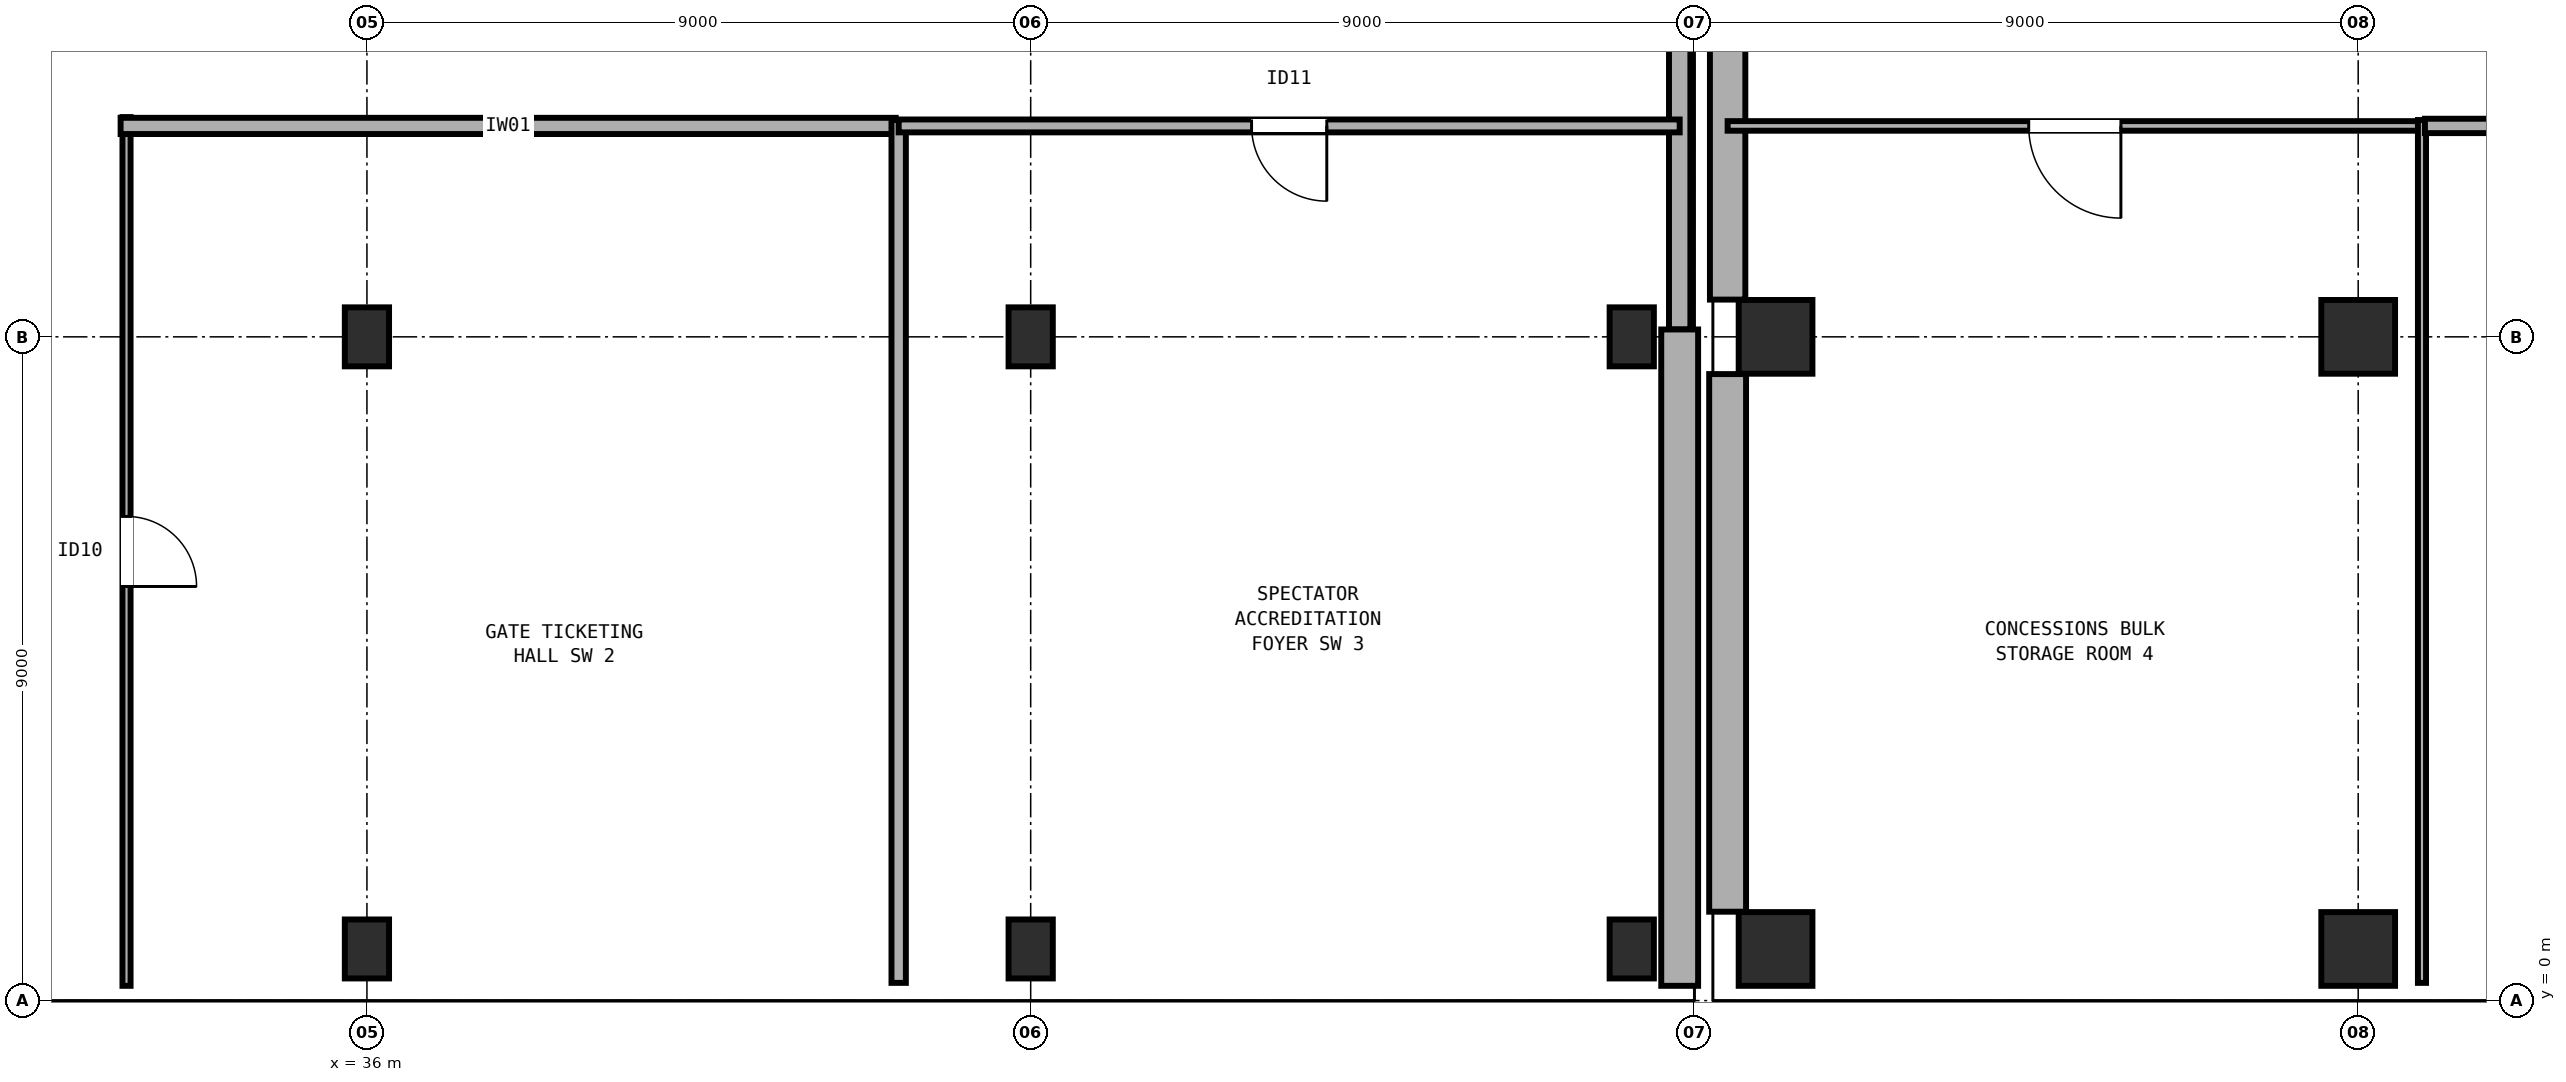
"""IFC4 building model, lengths in metres.
Left out: names, types, materials, properties, quantities, classifications, styles, units other than length and angle.
Written with IfcOpenShell. Run it as: python <this file> out.ifc"""

import sys

from ifc_helpers import new_model, si_unit, direction, frame, frame_2d, origin, origin_2d, place, context, subcontext, project, spatial, rectangle, extrude, element, fill, save


model = new_model("IFC4")
c1 = context("Model", 3, precision=1e-05, world=origin(), true_north=direction((0.0, 1.0)))
c2 = subcontext(c1, "Body", "Model", "MODEL_VIEW")
j1 = project(units=[si_unit("LENGTHUNIT", "METRE"), si_unit("PLANEANGLEUNIT", "RADIAN")], contexts=[c1])
p1 = place(None, origin())
s1 = spatial("IfcSite", under=j1, at=p1, CompositionType="ELEMENT")
p2 = place(p1, origin())
s2 = spatial("IfcBuilding", under=s1, at=p2, CompositionType="ELEMENT")
p3 = place(p2, origin())
s3 = spatial("IfcBuildingStorey", under=s2, at=p3, CompositionType="ELEMENT", Elevation=0.0)
for number, where, z_axis, x_axis in (
    (1, (55.1, 0.7, 0.0), (0.0, 0.0, 1.0), (1.0, 0.0, 0.0)),
    (2, (55.1, 9.0, 0.0), (0.0, 0.0, 1.0), (1.0, 0.0, 0.0)),
    (3, (63.0, 0.7, 0.0), (0.0, 0.0, 1.0), (1.0, 0.0, 0.0)),
    (4, (63.0, 9.0, 0.0), (0.0, 0.0, 1.0), (1.0, 0.0, 0.0)),
):
    element("IfcColumn", number, at=place(p3, frame(where, z_axis=z_axis, x_axis=x_axis)), inside=s3, PredefinedType="COLUMN", context=c2, shape_type="SweptSolid", body=[
        extrude(rectangle(XDim=1.0, YDim=1.0, at=origin_2d()), origin(), (0.0, 0.0, 1.0), 4.8),
    ])
for number, where, z_axis, x_axis in (
    (5, (36.0, 0.7, 0.0), (0.0, 0.0, 1.0), (1.0, 0.0, 0.0)),
    (6, (36.0, 9.0, 0.0), (0.0, 0.0, 1.0), (1.0, 0.0, 0.0)),
    (7, (45.0, 0.7, 0.0), (0.0, 0.0, 1.0), (1.0, 0.0, 0.0)),
    (8, (45.0, 9.0, 0.0), (0.0, 0.0, 1.0), (1.0, 0.0, 0.0)),
    (9, (53.15, 0.7, 0.0), (0.0, 0.0, 1.0), (1.0, 0.0, 0.0)),
    (10, (53.15, 9.0, 0.0), (0.0, 0.0, 1.0), (1.0, 0.0, 0.0)),
):
    element("IfcColumn", number, at=place(p3, frame(where, z_axis=z_axis, x_axis=x_axis)), inside=s3, PredefinedType="COLUMN", context=c2, shape_type="SweptSolid", body=[
        extrude(rectangle(XDim=0.6, YDim=0.8, at=origin_2d()), origin(), (0.0, 0.0, 1.0), 4.8),
    ])
p4 = place(p3, frame((54.45, 1.205, 0.0), z_axis=(0.0, 0.0, 1.0), x_axis=(0.0, 1.0, 0.0)))
e11 = element("IfcWall", 11, at=p4, inside=s3, PredefinedType="SOLIDWALL", context=c2, shape_type="SweptSolid", body=[
    extrude(rectangle(XDim=7.29, YDim=0.5, at=frame_2d((3.645, 0.0))), origin(), (0.0, 0.0, 1.0), 3.28),
])
p5 = place(p3, frame((54.45, 9.505, 0.0), z_axis=(0.0, 0.0, 1.0), x_axis=(0.0, 1.0, 0.0)))
e12 = element("IfcWall", 12, at=p5, inside=s3, PredefinedType="SOLIDWALL", context=c2, shape_type="SweptSolid", body=[
    extrude(rectangle(XDim=7.99, YDim=0.48, at=frame_2d((3.995, 0.0))), origin(), (0.0, 0.0, 1.0), 3.28),
])
p6 = place(p3, frame((71.495, 0.2, 0.0), z_axis=(0.0, 0.0, 1.0), x_axis=(-1.0, 0.0, 0.0)))
e13 = element("IfcWall", 13, at=p6, inside=s3, PredefinedType="SOLIDWALL", context=c2, shape_type="SweptSolid", body=[
    extrude(rectangle(XDim=7.99, YDim=0.31, at=frame_2d((3.995, 0.0))), origin(), (0.0, 0.0, 1.0), 3.58),
])
p7 = place(p6, frame((2.545, 0.0, 0.0)))
e14 = element("IfcOpeningElement", 14, at=p7, cuts=e13, PredefinedType="OPENING", context=c2, shape_type="SweptSolid", body=[
    extrude(rectangle(XDim=2.9, YDim=2.45, at=frame_2d((1.45, 1.225))), frame((0.0, 0.165, 0.0), z_axis=(0.0, -1.0, 0.0), x_axis=(1.0, 0.0, 0.0)), (0.0, 0.0, 1.0), 0.33),
])
p8 = place(p3, frame((62.495, 0.2, 0.0), z_axis=(0.0, 0.0, 1.0), x_axis=(-1.0, 0.0, 0.0)))
e15 = element("IfcWall", 15, at=p8, inside=s3, PredefinedType="SOLIDWALL", context=c2, shape_type="SweptSolid", body=[
    extrude(rectangle(XDim=6.89, YDim=0.29, at=frame_2d((3.445, 0.0))), origin(), (0.0, 0.0, 1.0), 3.58),
])
p9 = place(p8, frame((1.845, 0.0, 0.0)))
e16 = element("IfcOpeningElement", 16, at=p9, cuts=e15, PredefinedType="OPENING", context=c2, shape_type="SweptSolid", body=[
    extrude(rectangle(XDim=3.2, YDim=2.5, at=frame_2d((1.6, 1.25))), frame((0.0, 0.155, 0.0), z_axis=(0.0, -1.0, 0.0), x_axis=(1.0, 0.0, 0.0)), (0.0, 0.0, 1.0), 0.31),
])
p10 = place(p3, frame((53.8, 18.0, 0.0), z_axis=(0.0, 0.0, 1.0), x_axis=(0.0, -1.0, 0.0)))
e17 = element("IfcWall", 17, at=p10, inside=s3, PredefinedType="SOLIDWALL", context=c2, shape_type="SweptSolid", body=[
    extrude(rectangle(XDim=8.9, YDim=0.29, at=frame_2d((4.45, 0.0))), origin(), (0.0, 0.0, 1.0), 3.28),
])
p11 = place(p3, frame((53.8, 9.1, 0.0), z_axis=(0.0, 0.0, 1.0), x_axis=(0.0, -1.0, 0.0)))
e18 = element("IfcWall", 18, at=p11, inside=s3, PredefinedType="SOLIDWALL", context=c2, shape_type="SweptSolid", body=[
    extrude(rectangle(XDim=8.9, YDim=0.5, at=frame_2d((4.45, 0.0))), origin(), (0.0, 0.0, 1.0), 3.28),
])
p12 = place(p3, frame((52.845, 0.2, 0.0), z_axis=(0.0, 0.0, 1.0), x_axis=(-1.0, 0.0, 0.0)))
e19 = element("IfcWall", 19, at=p12, inside=s3, PredefinedType="SOLIDWALL", context=c2, shape_type="SweptSolid", body=[
    extrude(rectangle(XDim=7.54, YDim=0.48, at=frame_2d((3.77, 0.0))), origin(), (0.0, 0.0, 1.0), 3.28),
])
p13 = place(p12, frame((2.22, 0.0, 0.0)))
e20 = element("IfcOpeningElement", 20, at=p13, cuts=e19, PredefinedType="OPENING", context=c2, shape_type="SweptSolid", body=[
    extrude(rectangle(XDim=3.1, YDim=2.5, at=frame_2d((1.55, 1.25))), frame((0.0, 0.25, 0.0), z_axis=(0.0, -1.0, 0.0), x_axis=(1.0, 0.0, 0.0)), (0.0, 0.0, 1.0), 0.5),
])
p14 = place(p3, frame((44.695, 0.2, 0.0), z_axis=(0.0, 0.0, 1.0), x_axis=(-1.0, 0.0, 0.0)))
e21 = element("IfcWall", 21, at=p14, inside=s3, PredefinedType="SOLIDWALL", context=c2, shape_type="SweptSolid", body=[
    extrude(rectangle(XDim=8.39, YDim=0.31, at=frame_2d((4.195, 0.0))), origin(), (0.0, 0.0, 1.0), 3.28),
])
p15 = place(p14, frame((2.695, 0.0, 0.0)))
e22 = element("IfcOpeningElement", 22, at=p15, cuts=e21, PredefinedType="OPENING", context=c2, shape_type="SweptSolid", body=[
    extrude(rectangle(XDim=3.0, YDim=2.45, at=frame_2d((1.5, 1.225))), frame((0.0, 0.165, 0.0), z_axis=(0.0, -1.0, 0.0), x_axis=(1.0, 0.0, 0.0)), (0.0, 0.0, 1.0), 0.33),
])
p16 = place(p3, frame((35.695, 0.2, 0.0), z_axis=(0.0, 0.0, 1.0), x_axis=(-1.0, 0.0, 0.0)))
e23 = element("IfcWall", 23, at=p16, inside=s3, PredefinedType="SOLIDWALL", context=c2, shape_type="SweptSolid", body=[
    extrude(rectangle(XDim=8.39, YDim=0.29, at=frame_2d((4.195, 0.0))), origin(), (0.0, 0.0, 1.0), 3.58),
])
p17 = place(p16, frame((3.495, 0.0, 0.0)))
e24 = element("IfcOpeningElement", 24, at=p17, cuts=e23, PredefinedType="OPENING", context=c2, shape_type="SweptSolid", body=[
    extrude(rectangle(XDim=3.4, YDim=2.55, at=frame_2d((1.7, 1.275))), frame((0.0, 0.155, 0.0), z_axis=(0.0, -1.0, 0.0), x_axis=(1.0, 0.0, 0.0)), (0.0, 0.0, 1.0), 0.31),
])
p18 = place(p3, frame((63.865, 11.86, 0.0), z_axis=(0.0, 0.0, 1.0), x_axis=(-1.0, 0.0, 0.0)))
e25 = element("IfcWall", 25, at=p18, inside=s3, PredefinedType="PARTITIONING", context=c2, shape_type="SweptSolid", body=[
    extrude(rectangle(XDim=9.415, YDim=0.13, at=frame_2d((4.708, 0.0))), origin(), (0.0, 0.0, 1.0), 3.28),
])
p19 = place(p18, frame((4.083, 0.0, 0.0)))
e26 = element("IfcOpeningElement", 26, at=p19, cuts=e25, PredefinedType="OPENING", context=c2, shape_type="SweptSolid", body=[
    extrude(rectangle(XDim=1.25, YDim=2.15, at=frame_2d((0.625, 1.075))), frame((0.0, 0.075, 0.0), z_axis=(0.0, -1.0, 0.0), x_axis=(1.0, 0.0, 0.0)), (0.0, 0.0, 1.0), 0.15),
])
p20 = place(p3, frame((63.865, 11.94, 0.0), z_axis=(0.0, 0.0, 1.0), x_axis=(0.0, -1.0, 0.0)))
e27 = element("IfcWall", 27, at=p20, inside=s3, PredefinedType="PARTITIONING", context=c2, shape_type="SweptSolid", body=[
    extrude(rectangle(XDim=11.7, YDim=0.11, at=frame_2d((5.85, 0.0))), origin(), (0.0, 0.0, 1.0), 3.28),
])
p21 = place(p3, frame((63.905, 11.86, 0.0), z_axis=(0.0, 0.0, 1.0), x_axis=(1.0, 0.0, 0.0)))
e28 = element("IfcWall", 28, at=p21, inside=s3, PredefinedType="PARTITIONING", context=c2, shape_type="SweptSolid", body=[
    extrude(rectangle(XDim=9.335, YDim=0.195, at=frame_2d((4.667, 0.0))), origin(), (0.0, 0.0, 1.0), 3.28),
])
p22 = place(p3, frame((32.74, 11.98, 0.0), z_axis=(0.0, 0.0, 1.0), x_axis=(0.0, -1.0, 0.0)))
e29 = element("IfcWall", 29, at=p22, inside=s3, PredefinedType="PARTITIONING", context=c2, shape_type="SweptSolid", body=[
    extrude(rectangle(XDim=11.78, YDim=0.11, at=frame_2d((5.89, 0.0))), origin(), (0.0, 0.0, 1.0), 3.28),
])
p23 = place(p22, frame((5.415, 0.0, 0.0)))
e30 = element("IfcOpeningElement", 30, at=p23, cuts=e29, PredefinedType="OPENING", context=c2, shape_type="SweptSolid", body=[
    extrude(rectangle(XDim=0.95, YDim=2.18, at=frame_2d((0.475, 1.09))), frame((0.0, 0.065, 0.0), z_axis=(0.0, -1.0, 0.0), x_axis=(1.0, 0.0, 0.0)), (0.0, 0.0, 1.0), 0.13),
])
p24 = place(p3, frame((32.66, 11.86, 0.0), z_axis=(0.0, 0.0, 1.0), x_axis=(1.0, 0.0, 0.0)))
e31 = element("IfcWall", 31, at=p24, inside=s3, PredefinedType="PARTITIONING", context=c2, shape_type="SweptSolid", body=[
    extrude(rectangle(XDim=10.51, YDim=0.22, at=frame_2d((5.255, 0.0))), origin(), (0.0, 0.0, 1.0), 3.28),
])
p25 = place(p3, frame((43.21, 11.94, 0.0), z_axis=(0.0, 0.0, 1.0), x_axis=(0.0, -1.0, 0.0)))
e32 = element("IfcWall", 32, at=p25, inside=s3, PredefinedType="PARTITIONING", context=c2, shape_type="SweptSolid", body=[
    extrude(rectangle(XDim=11.7, YDim=0.195, at=frame_2d((5.85, 0.0))), origin(), (0.0, 0.0, 1.0), 3.28),
])
p26 = place(p3, frame((53.8, 11.86, 0.0), z_axis=(0.0, 0.0, 1.0), x_axis=(-1.0, 0.0, 0.0)))
e33 = element("IfcWall", 33, at=p26, inside=s3, PredefinedType="PARTITIONING", context=c2, shape_type="SweptSolid", body=[
    extrude(rectangle(XDim=10.59, YDim=0.175, at=frame_2d((5.295, 0.0))), origin(), (0.0, 0.0, 1.0), 3.28),
])
p27 = place(p26, frame((4.785, 0.0, 0.0)))
e34 = element("IfcOpeningElement", 34, at=p27, cuts=e33, PredefinedType="OPENING", context=c2, shape_type="SweptSolid", body=[
    extrude(rectangle(XDim=1.02, YDim=2.16, at=frame_2d((0.51, 1.08))), frame((0.0, 0.097, 0.0), z_axis=(0.0, -1.0, 0.0), x_axis=(1.0, 0.0, 0.0)), (0.0, 0.0, 1.0), 0.195),
])
p28 = place(p17, origin())
e35 = element("IfcDoor", 35, at=p28, inside=s3, OperationType="DOUBLE_DOOR_SINGLE_SWING", PredefinedType="DOOR", context=c2, shape_type="SweptSolid", body=[
    extrude(rectangle(XDim=3.4, YDim=2.55, at=frame_2d((1.7, 1.275))), frame((0.0, 0.025, 0.0), z_axis=(0.0, -1.0, 0.0), x_axis=(1.0, 0.0, 0.0)), (0.0, 0.0, 1.0), 0.05),
])
fill(e24, e35)
p29 = place(p9, origin())
e36 = element("IfcDoor", 36, at=p29, inside=s3, OperationType="DOUBLE_DOOR_SINGLE_SWING", PredefinedType="DOOR", context=c2, shape_type="SweptSolid", body=[
    extrude(rectangle(XDim=3.2, YDim=2.5, at=frame_2d((1.6, 1.25))), frame((0.0, 0.025, 0.0), z_axis=(0.0, -1.0, 0.0), x_axis=(1.0, 0.0, 0.0)), (0.0, 0.0, 1.0), 0.05),
])
fill(e16, e36)
p30 = place(p13, origin())
e37 = element("IfcDoor", 37, at=p30, inside=s3, OperationType="DOUBLE_DOOR_SINGLE_SWING", PredefinedType="DOOR", context=c2, shape_type="SweptSolid", body=[
    extrude(rectangle(XDim=3.1, YDim=2.5, at=frame_2d((1.55, 1.25))), frame((0.0, 0.025, 0.0), z_axis=(0.0, -1.0, 0.0), x_axis=(1.0, 0.0, 0.0)), (0.0, 0.0, 1.0), 0.05),
])
fill(e20, e37)
p31 = place(p15, origin())
e38 = element("IfcDoor", 38, at=p31, inside=s3, OperationType="DOUBLE_DOOR_SINGLE_SWING", PredefinedType="DOOR", context=c2, shape_type="SweptSolid", body=[
    extrude(rectangle(XDim=3.0, YDim=2.45, at=frame_2d((1.5, 1.225))), frame((0.0, 0.025, 0.0), z_axis=(0.0, -1.0, 0.0), x_axis=(1.0, 0.0, 0.0)), (0.0, 0.0, 1.0), 0.05),
])
fill(e22, e38)
p32 = place(p19, origin())
e39 = element("IfcDoor", 39, at=p32, inside=s3, OperationType="SINGLE_SWING_LEFT", PredefinedType="DOOR", context=c2, shape_type="SweptSolid", body=[
    extrude(rectangle(XDim=1.25, YDim=2.15, at=frame_2d((0.625, 1.075))), frame((0.0, 0.025, 0.0), z_axis=(0.0, -1.0, 0.0), x_axis=(1.0, 0.0, 0.0)), (0.0, 0.0, 1.0), 0.05),
])
fill(e26, e39)
p33 = place(p23, origin())
e40 = element("IfcDoor", 40, at=p33, inside=s3, OperationType="SINGLE_SWING_RIGHT", PredefinedType="DOOR", context=c2, shape_type="SweptSolid", body=[
    extrude(rectangle(XDim=0.95, YDim=2.18, at=frame_2d((0.475, 1.09))), frame((0.0, 0.025, 0.0), z_axis=(0.0, -1.0, 0.0), x_axis=(1.0, 0.0, 0.0)), (0.0, 0.0, 1.0), 0.05),
])
fill(e30, e40)
p34 = place(p27, origin())
e41 = element("IfcDoor", 41, at=p34, inside=s3, OperationType="SINGLE_SWING_LEFT", PredefinedType="DOOR", context=c2, shape_type="SweptSolid", body=[
    extrude(rectangle(XDim=1.02, YDim=2.16, at=frame_2d((0.51, 1.08))), frame((0.0, 0.025, 0.0), z_axis=(0.0, -1.0, 0.0), x_axis=(1.0, 0.0, 0.0)), (0.0, 0.0, 1.0), 0.05),
])
fill(e34, e41)
save(model, sys.argv[1])
